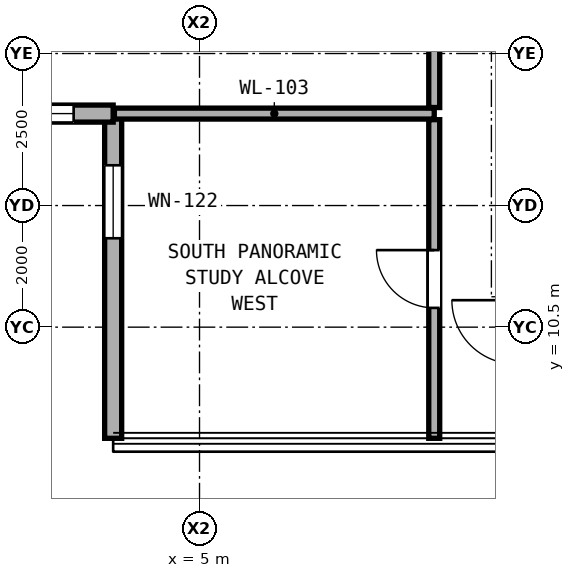
"""IFC4 building model, lengths in metres.
Left out: names, types, materials, properties, quantities, classifications, styles, units other than length and angle.
Written with IfcOpenShell. Run it as: python <this file> out.ifc"""

import sys

from ifc_helpers import new_model, si_unit, direction, frame, frame_2d, origin, place, context, subcontext, project, spatial, rectangle, extrude, element, fill, save


model = new_model("IFC4")
c1 = context("Model", 3, precision=1e-05, world=origin(), true_north=direction((0.0, 1.0)))
c2 = subcontext(c1, "Body", "Model", "MODEL_VIEW")
j1 = project(units=[si_unit("LENGTHUNIT", "METRE"), si_unit("PLANEANGLEUNIT", "RADIAN")], contexts=[c1])
p1 = place(None, origin())
s1 = spatial("IfcSite", under=j1, at=p1, CompositionType="ELEMENT")
p2 = place(p1, origin())
s2 = spatial("IfcBuilding", under=s1, at=p2, CompositionType="ELEMENT")
p3 = place(p2, frame((0.0, 0.0, 71.9)))
s3 = spatial("IfcBuildingStorey", under=s2, at=p3, CompositionType="ELEMENT", Elevation=71.9)
p4 = place(p3, frame((3.58, 14.012, 0.0), z_axis=(0.0, 0.0, 1.0), x_axis=(0.0, -1.0, 0.0)))
e1 = element("IfcWall", 1, at=p4, inside=s3, PredefinedType="SOLIDWALL", context=c2, shape_type="SweptSolid", body=[
    extrude(rectangle(XDim=5.34, YDim=0.28, at=frame_2d((2.67, 0.0))), origin(), (0.0, 0.0, 1.0), 3.04),
])
p5 = place(p4, frame((0.85, 0.0, 0.79)))
e2 = element("IfcOpeningElement", 2, at=p5, cuts=e1, PredefinedType="OPENING", context=c2, shape_type="SweptSolid", body=[
    extrude(rectangle(XDim=1.2, YDim=2.1, at=frame_2d((0.6, 1.05))), frame((0.0, 0.15, 0.0), z_axis=(0.0, -1.0, 0.0), x_axis=(1.0, 0.0, 0.0)), (0.0, 0.0, 1.0), 0.3),
])
p6 = place(p3, frame((-1.76, 14.012, 0.0), z_axis=(0.0, 0.0, 1.0), x_axis=(1.0, 0.0, 0.0)))
e3 = element("IfcWall", 3, at=p6, inside=s3, PredefinedType="SOLIDWALL", context=c2, shape_type="SweptSolid", body=[
    extrude(rectangle(XDim=5.34, YDim=0.28, at=frame_2d((2.67, 0.0))), origin(), (0.0, 0.0, 1.0), 3.04),
])
p7 = place(p6, frame((3.59, 0.0, 0.85)))
e4 = element("IfcOpeningElement", 4, at=p7, cuts=e3, PredefinedType="OPENING", context=c2, shape_type="SweptSolid", body=[
    extrude(rectangle(XDim=1.1, YDim=2.0, at=frame_2d((0.55, 1.0))), frame((0.0, 0.15, 0.0), z_axis=(0.0, -1.0, 0.0), x_axis=(1.0, 0.0, 0.0)), (0.0, 0.0, 1.0), 0.3),
])
p8 = place(p3, frame((3.6, 14.012, 0.0), z_axis=(0.0, 0.0, 1.0), x_axis=(1.0, 0.0, 0.0)))
e5 = element("IfcWall", 5, at=p8, inside=s3, PredefinedType="PARTITIONING", context=c2, shape_type="SweptSolid", body=[
    extrude(rectangle(XDim=5.26, YDim=0.18, at=frame_2d((2.63, 0.0))), origin(), (0.0, 0.0, 1.0), 3.06),
])
p9 = place(p3, frame((8.86, 8.672, 0.0), z_axis=(0.0, 0.0, 1.0), x_axis=(0.0, 1.0, 0.0)))
e6 = element("IfcWall", 6, at=p9, inside=s3, PredefinedType="PARTITIONING", context=c2, shape_type="SweptSolid", body=[
    extrude(rectangle(XDim=5.24, YDim=0.18, at=frame_2d((2.62, 0.0))), origin(), (0.0, 0.0, 1.0), 3.06),
])
p10 = place(p9, frame((2.145, 0.0, 0.0)))
e7 = element("IfcOpeningElement", 7, at=p10, cuts=e6, PredefinedType="OPENING", context=c2, shape_type="SweptSolid", body=[
    extrude(rectangle(XDim=0.95, YDim=2.15, at=frame_2d((0.475, 1.075))), frame((0.0, 0.1, 0.0), z_axis=(0.0, -1.0, 0.0), x_axis=(1.0, 0.0, 0.0)), (0.0, 0.0, 1.0), 0.2),
])
p11 = place(p3, frame((8.86, 14.112, 0.0), z_axis=(0.0, 0.0, 1.0), x_axis=(0.0, 1.0, 0.0)))
e8 = element("IfcWall", 8, at=p11, inside=s3, PredefinedType="PARTITIONING", context=c2, shape_type="SweptSolid", body=[
    extrude(rectangle(XDim=8.288, YDim=0.18, at=frame_2d((4.144, 0.0))), origin(), (0.0, 0.0, 1.0), 2.436),
])
p12 = place(p11, frame((3.619, 0.0, 0.0)))
e9 = element("IfcOpeningElement", 9, at=p12, cuts=e8, PredefinedType="OPENING", context=c2, shape_type="SweptSolid", body=[
    extrude(rectangle(XDim=1.05, YDim=2.2, at=frame_2d((0.525, 1.1))), frame((0.0, 0.1, 0.0), z_axis=(0.0, -1.0, 0.0), x_axis=(1.0, 0.0, 0.0)), (0.0, 0.0, 1.0), 0.2),
])
p13 = place(p5, origin())
e10 = element("IfcWindow", 10, at=p13, inside=s3, PartitioningType="SINGLE_PANEL", PredefinedType="WINDOW", context=c2, shape_type="SweptSolid", body=[
    extrude(rectangle(XDim=1.2, YDim=2.1, at=frame_2d((0.6, 1.05))), frame((0.0, 0.03, 0.0), z_axis=(0.0, -1.0, 0.0), x_axis=(1.0, 0.0, 0.0)), (0.0, 0.0, 1.0), 0.06),
])
fill(e2, e10)
p14 = place(p7, origin())
e11 = element("IfcWindow", 11, at=p14, inside=s3, PartitioningType="SINGLE_PANEL", PredefinedType="WINDOW", context=c2, shape_type="SweptSolid", body=[
    extrude(rectangle(XDim=1.1, YDim=2.0, at=frame_2d((0.55, 1.0))), frame((0.0, 0.03, 0.0), z_axis=(0.0, -1.0, 0.0), x_axis=(1.0, 0.0, 0.0)), (0.0, 0.0, 1.0), 0.06),
])
fill(e4, e11)
p15 = place(p10, origin())
e12 = element("IfcDoor", 12, at=p15, inside=s3, OperationType="SINGLE_SWING_RIGHT", PredefinedType="DOOR", context=c2, shape_type="SweptSolid", body=[
    extrude(rectangle(XDim=0.95, YDim=2.15, at=frame_2d((0.475, 1.075))), frame((0.0, 0.025, 0.0), z_axis=(0.0, -1.0, 0.0), x_axis=(1.0, 0.0, 0.0)), (0.0, 0.0, 1.0), 0.05),
])
fill(e7, e12)
save(model, sys.argv[1])
